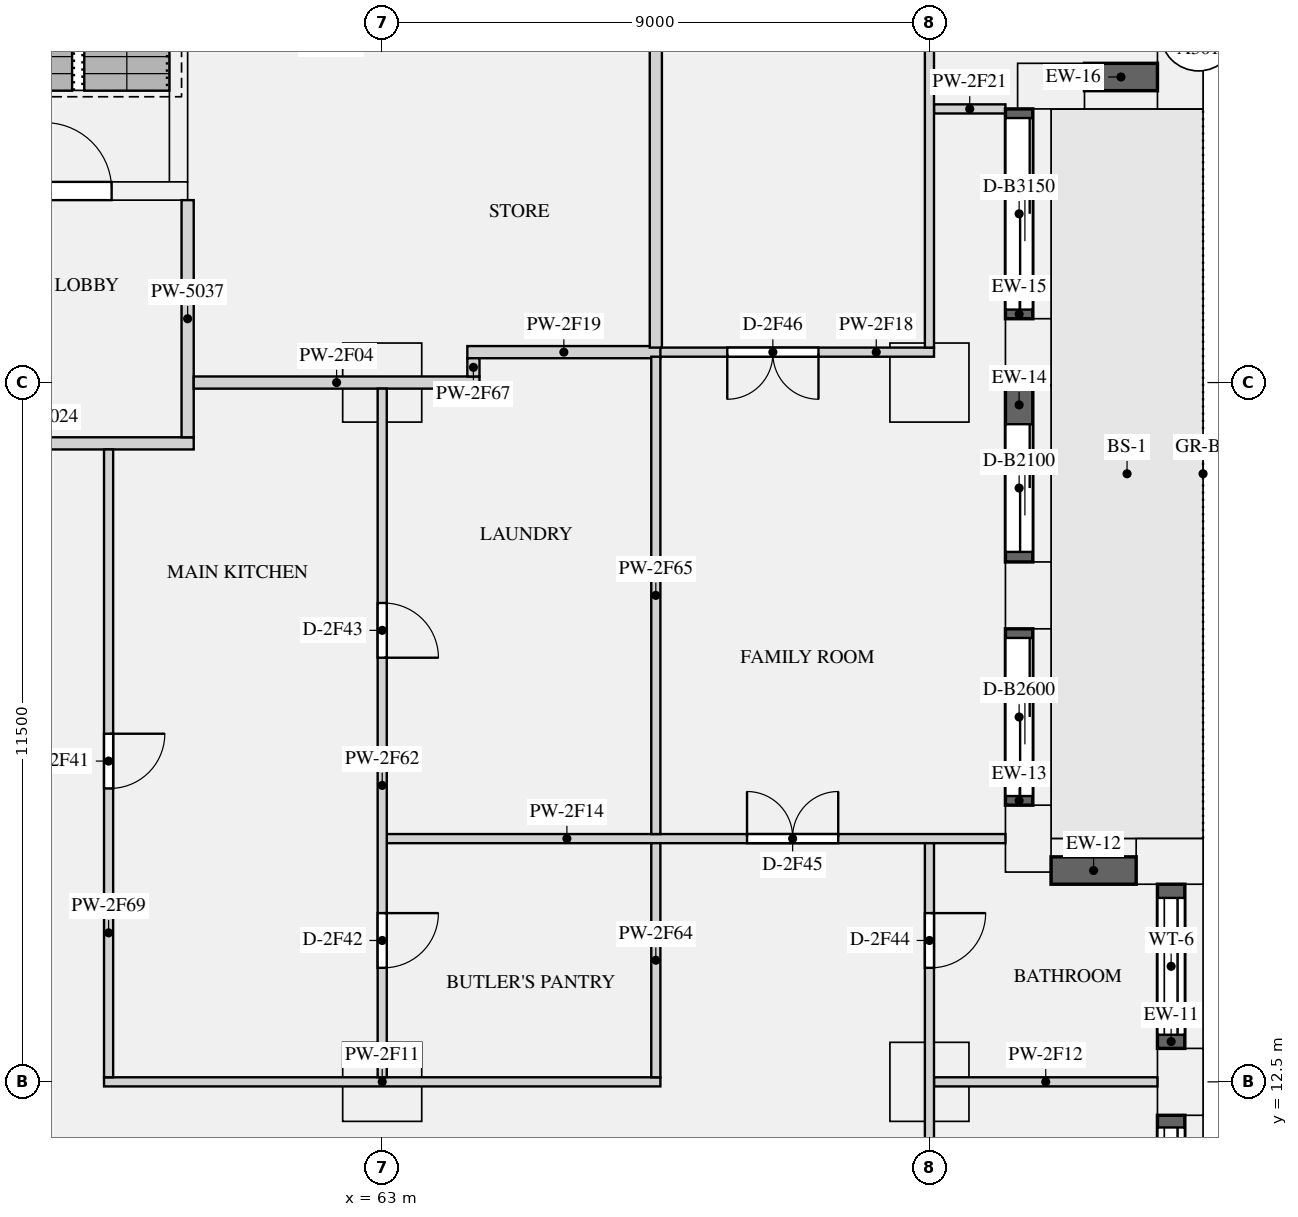
"""IFC4 building model, lengths in metres.
Left out: names, types, materials, properties, quantities, classifications, styles, units other than length and angle.
Written with IfcOpenShell. Run it as: python <this file> out.ifc"""

import sys

from ifc_helpers import new_model, si_unit, direction, frame, frame_2d, origin, origin_2d, place, context, subcontext, project, spatial, rectangle, extrude, element, fill, save


model = new_model("IFC4")
c1 = context("Model", 3, precision=1e-05, world=origin(), true_north=direction((0.0, 1.0)))
c2 = subcontext(c1, "Body", "Model", "MODEL_VIEW")
j1 = project(units=[si_unit("LENGTHUNIT", "METRE"), si_unit("PLANEANGLEUNIT", "RADIAN")], contexts=[c1])
p1 = place(None, origin())
s1 = spatial("IfcSite", under=j1, at=p1, CompositionType="ELEMENT")
p2 = place(p1, origin())
s2 = spatial("IfcBuilding", under=s1, at=p2, CompositionType="ELEMENT")
p3 = place(p2, frame((0.0, 0.0, 127.65)))
s3 = spatial("IfcBuildingStorey", under=s2, at=p3, CompositionType="ELEMENT", Elevation=127.65)
for number, where, z_axis, x_axis in (
    (1, (76.125, 12.5, 0.0), (0.0, 0.0, 1.0), (0.0, 1.0, 0.0)),
    (2, (75.95, 16.125, 0.0), (0.0, 0.0, 1.0), (-1.0, 0.0, 0.0)),
    (3, (73.625, 16.5, 0.0), (0.0, 0.0, 1.0), (0.0, 1.0, 0.0)),
    (4, (73.625, 20.5, 0.0), (0.0, 0.0, 1.0), (0.0, 1.0, 0.0)),
    (5, (73.625, 24.5, 0.0), (0.0, 0.0, 1.0), (0.0, 1.0, 0.0)),
    (6, (74.0, 28.875, 0.0), (0.0, 0.0, 1.0), (1.0, 0.0, 0.0)),
    (7, (76.125, 29.05, 0.0), (0.0, 0.0, 1.0), (0.0, 1.0, 0.0)),
):
    element("IfcColumn", number, at=place(p3, frame(where, z_axis=z_axis, x_axis=x_axis)), inside=s3, PredefinedType="USERDEFINED", context=c2, shape_type="SweptSolid", body=[
        extrude(rectangle(XDim=1.1, YDim=0.75, at=origin_2d()), origin(), (0.0, 0.0, 1.0), 3.15),
    ])
for number, where, z_axis, x_axis in (
    (8, (63.0, 24.0, 0.0), (0.0, 0.0, 1.0), (1.0, 0.0, 0.0)),
    (9, (72.0, 24.0, 0.0), (0.0, 0.0, 1.0), (1.0, 0.0, 0.0)),
    (10, (63.0, 12.5, 0.0), (0.0, 0.0, 1.0), (1.0, 0.0, 0.0)),
    (11, (72.0, 12.5, 0.0), (0.0, 0.0, 1.0), (1.0, 0.0, 0.0)),
):
    element("IfcColumn", number, at=place(p3, frame(where, z_axis=z_axis, x_axis=x_axis)), inside=s3, PredefinedType="COLUMN", context=c2, shape_type="SweptSolid", body=[
        extrude(rectangle(XDim=1.3, YDim=1.3, at=origin_2d()), origin(), (0.0, 0.0, 1.0), 3.15),
    ])
p4 = place(p3, frame((56.2, 27.15, 0.0), z_axis=(0.0, 0.0, 1.0), x_axis=(1.0, 0.0, 0.0)))
e12 = element("IfcWall", 12, at=p4, inside=s3, PredefinedType="SHEAR", context=c2, shape_type="SweptSolid", body=[
    extrude(rectangle(XDim=3.6, YDim=0.3, at=frame_2d((1.8, 0.0))), origin(), (0.0, 0.0, 1.0), 3.15),
])
p5 = place(p4, frame((1.25, 0.0, 0.0)))
e13 = element("IfcOpeningElement", 13, at=p5, cuts=e12, PredefinedType="OPENING", context=c2, shape_type="SweptSolid", body=[
    extrude(rectangle(XDim=1.1, YDim=2.1, at=frame_2d((0.55, 1.05))), frame((0.0, 0.16, 0.0), z_axis=(0.0, -1.0, 0.0), x_axis=(1.0, 0.0, 0.0)), (0.0, 0.0, 1.0), 0.32),
])
p6 = place(p3, frame((59.65, 27.3, 0.0), z_axis=(0.0, 0.0, 1.0), x_axis=(0.0, 1.0, 0.0)))
e14 = element("IfcWall", 14, at=p6, inside=s3, PredefinedType="SHEAR", context=c2, shape_type="SweptSolid", body=[
    extrude(rectangle(XDim=7.8, YDim=0.3, at=frame_2d((3.9, 0.0))), origin(), (0.0, 0.0, 1.0), 3.15),
])
p7 = place(p3, frame((75.975, 9.05, 0.9), z_axis=(0.0, 0.0, 1.0), x_axis=(0.0, 1.0, 0.0)))
e15 = element("IfcWall", 15, at=p7, inside=s3, PredefinedType="SOLIDWALL", context=c2, shape_type="SweptSolid", body=[
    extrude(rectangle(XDim=2.9, YDim=0.45, at=frame_2d((1.45, 0.0))), origin(), (0.0, 0.0, 1.0), 1.75),
])
p8 = place(p7, frame((0.2, 0.0, 0.15)))
e16 = element("IfcOpeningElement", 16, at=p8, cuts=e15, PredefinedType="OPENING", context=c2, shape_type="SweptSolid", body=[
    extrude(rectangle(XDim=2.5, YDim=1.5, at=frame_2d((1.25, 0.75))), frame((0.0, 0.235, 0.0), z_axis=(0.0, -1.0, 0.0), x_axis=(1.0, 0.0, 0.0)), (0.0, 0.0, 1.0), 0.47),
])
p9 = place(p3, frame((75.975, 13.05, 0.9), z_axis=(0.0, 0.0, 1.0), x_axis=(0.0, 1.0, 0.0)))
e17 = element("IfcWall", 17, at=p9, inside=s3, PredefinedType="SOLIDWALL", context=c2, shape_type="SweptSolid", body=[
    extrude(rectangle(XDim=2.7, YDim=0.45, at=frame_2d((1.35, 0.0))), origin(), (0.0, 0.0, 1.0), 1.75),
])
p10 = place(p9, frame((0.225, 0.0, 0.15)))
e18 = element("IfcOpeningElement", 18, at=p10, cuts=e17, PredefinedType="OPENING", context=c2, shape_type="SweptSolid", body=[
    extrude(rectangle(XDim=2.25, YDim=1.5, at=frame_2d((1.125, 0.75))), frame((0.0, 0.235, 0.0), z_axis=(0.0, -1.0, 0.0), x_axis=(1.0, 0.0, 0.0)), (0.0, 0.0, 1.0), 0.47),
])
p11 = place(p3, frame((75.4, 15.975, 0.9), z_axis=(0.0, 0.0, 1.0), x_axis=(-1.0, 0.0, 0.0)))
e19 = element("IfcWall", 19, at=p11, inside=s3, PredefinedType="SOLIDWALL", context=c2, shape_type="SweptSolid", body=[
    extrude(rectangle(XDim=1.4, YDim=0.45, at=frame_2d((0.7, 0.0))), origin(), (0.0, 0.0, 1.0), 1.75),
])
p12 = place(p3, frame((73.475, 17.05, 0.0), z_axis=(0.0, 0.0, 1.0), x_axis=(0.0, 1.0, 0.0)))
e20 = element("IfcWall", 20, at=p12, inside=s3, PredefinedType="SOLIDWALL", context=c2, shape_type="SweptSolid", body=[
    extrude(rectangle(XDim=2.9, YDim=0.45, at=frame_2d((1.45, 0.0))), origin(), (0.0, 0.0, 1.0), 2.65),
])
p13 = place(p12, frame((0.15, 0.0, 0.0)))
e21 = element("IfcOpeningElement", 21, at=p13, cuts=e20, PredefinedType="OPENING", context=c2, shape_type="SweptSolid", body=[
    extrude(rectangle(XDim=2.6, YDim=2.3, at=frame_2d((1.3, 1.15))), frame((0.0, 0.235, 0.0), z_axis=(0.0, -1.0, 0.0), x_axis=(1.0, 0.0, 0.0)), (0.0, 0.0, 1.0), 0.47),
])
p14 = place(p3, frame((73.475, 21.05, 0.0), z_axis=(0.0, 0.0, 1.0), x_axis=(0.0, 1.0, 0.0)))
e22 = element("IfcWall", 22, at=p14, inside=s3, PredefinedType="SOLIDWALL", context=c2, shape_type="SweptSolid", body=[
    extrude(rectangle(XDim=2.9, YDim=0.45, at=frame_2d((1.45, 0.0))), origin(), (0.0, 0.0, 1.0), 2.65),
])
p15 = place(p14, frame((0.165, 0.0, 0.0)))
e23 = element("IfcOpeningElement", 23, at=p15, cuts=e22, PredefinedType="OPENING", context=c2, shape_type="SweptSolid", body=[
    extrude(rectangle(XDim=2.1, YDim=2.3, at=frame_2d((1.05, 1.15))), frame((0.0, 0.235, 0.0), z_axis=(0.0, -1.0, 0.0), x_axis=(1.0, 0.0, 0.0)), (0.0, 0.0, 1.0), 0.47),
])
p16 = place(p3, frame((73.475, 25.05, 0.0), z_axis=(0.0, 0.0, 1.0), x_axis=(0.0, 1.0, 0.0)))
e24 = element("IfcWall", 24, at=p16, inside=s3, PredefinedType="SOLIDWALL", context=c2, shape_type="SweptSolid", body=[
    extrude(rectangle(XDim=3.45, YDim=0.45, at=frame_2d((1.725, 0.0))), origin(), (0.0, 0.0, 1.0), 2.65),
])
p17 = place(p16, frame((0.15, 0.0, 0.0)))
e25 = element("IfcOpeningElement", 25, at=p17, cuts=e24, PredefinedType="OPENING", context=c2, shape_type="SweptSolid", body=[
    extrude(rectangle(XDim=3.15, YDim=2.3, at=frame_2d((1.575, 1.15))), frame((0.0, 0.235, 0.0), z_axis=(0.0, -1.0, 0.0), x_axis=(1.0, 0.0, 0.0)), (0.0, 0.0, 1.0), 0.47),
])
p18 = place(p3, frame((74.55, 29.025, 0.9), z_axis=(0.0, 0.0, 1.0), x_axis=(1.0, 0.0, 0.0)))
e26 = element("IfcWall", 26, at=p18, inside=s3, PredefinedType="SOLIDWALL", context=c2, shape_type="SweptSolid", body=[
    extrude(rectangle(XDim=1.2, YDim=0.45, at=frame_2d((0.6, 0.0))), origin(), (0.0, 0.0, 1.0), 1.75),
])
p19 = place(p3, frame((54.9, 23.0, 0.0), z_axis=(0.0, 0.0, 1.0), x_axis=(1.0, 0.0, 0.0)))
e27 = element("IfcWall", 27, at=p19, inside=s3, PredefinedType="PARTITIONING", context=c2, shape_type="SweptSolid", body=[
    extrude(rectangle(XDim=5.0, YDim=0.2, at=frame_2d((2.5, 0.0))), origin(), (0.0, 0.0, 1.0), 2.65),
])
p20 = place(p3, frame((59.8, 23.1, 0.0), z_axis=(0.0, 0.0, 1.0), x_axis=(0.0, 1.0, 0.0)))
e28 = element("IfcWall", 28, at=p20, inside=s3, PredefinedType="PARTITIONING", context=c2, shape_type="SweptSolid", body=[
    extrude(rectangle(XDim=3.9, YDim=0.2, at=frame_2d((1.95, 0.0))), origin(), (0.0, 0.0, 1.0), 2.65),
])
p21 = place(p3, frame((59.9, 24.0, 0.0), z_axis=(0.0, 0.0, 1.0), x_axis=(1.0, 0.0, 0.0)))
e29 = element("IfcWall", 29, at=p21, inside=s3, PredefinedType="PARTITIONING", context=c2, shape_type="SweptSolid", body=[
    extrude(rectangle(XDim=4.7, YDim=0.2, at=frame_2d((2.35, 0.0))), origin(), (0.0, 0.0, 1.0), 2.65),
])
p22 = place(p3, frame((58.425, 12.5, 0.0), z_axis=(0.0, 0.0, 1.0), x_axis=(1.0, 0.0, 0.0)))
e30 = element("IfcWall", 30, at=p22, inside=s3, PredefinedType="PARTITIONING", context=c2, shape_type="SweptSolid", body=[
    extrude(rectangle(XDim=9.15, YDim=0.15, at=frame_2d((4.575, 0.0))), origin(), (0.0, 0.0, 1.0), 2.65),
])
p23 = place(p3, frame((72.075, 12.5, 0.0), z_axis=(0.0, 0.0, 1.0), x_axis=(1.0, 0.0, 0.0)))
e31 = element("IfcWall", 31, at=p23, inside=s3, PredefinedType="PARTITIONING", context=c2, shape_type="SweptSolid", body=[
    extrude(rectangle(XDim=3.675, YDim=0.15, at=frame_2d((1.837, 0.0))), origin(), (0.0, 0.0, 1.0), 2.65),
])
p24 = place(p3, frame((63.075, 16.5, 0.0), z_axis=(0.0, 0.0, 1.0), x_axis=(1.0, 0.0, 0.0)))
e32 = element("IfcWall", 32, at=p24, inside=s3, PredefinedType="PARTITIONING", context=c2, shape_type="SweptSolid", body=[
    extrude(rectangle(XDim=10.175, YDim=0.15, at=frame_2d((5.087, 0.0))), origin(), (0.0, 0.0, 1.0), 2.65),
])
p25 = place(p24, frame((5.925, 0.0, 0.0)))
e33 = element("IfcOpeningElement", 33, at=p25, cuts=e32, PredefinedType="OPENING", context=c2, shape_type="SweptSolid", body=[
    extrude(rectangle(XDim=1.5, YDim=2.1, at=frame_2d((0.75, 1.05))), frame((0.0, 0.085, 0.0), z_axis=(0.0, -1.0, 0.0), x_axis=(1.0, 0.0, 0.0)), (0.0, 0.0, 1.0), 0.17),
])
p26 = place(p3, frame((67.425, 24.5, 0.0), z_axis=(0.0, 0.0, 1.0), x_axis=(1.0, 0.0, 0.0)))
e34 = element("IfcWall", 34, at=p26, inside=s3, PredefinedType="PARTITIONING", context=c2, shape_type="SweptSolid", body=[
    extrude(rectangle(XDim=4.65, YDim=0.15, at=frame_2d((2.325, 0.0))), origin(), (0.0, 0.0, 1.0), 2.65),
])
p27 = place(p26, frame((1.25, 0.0, 0.0)))
e35 = element("IfcOpeningElement", 35, at=p27, cuts=e34, PredefinedType="OPENING", context=c2, shape_type="SweptSolid", body=[
    extrude(rectangle(XDim=1.5, YDim=2.1, at=frame_2d((0.75, 1.05))), frame((0.0, 0.085, 0.0), z_axis=(0.0, -1.0, 0.0), x_axis=(1.0, 0.0, 0.0)), (0.0, 0.0, 1.0), 0.17),
])
p28 = place(p3, frame((64.4, 24.5, 0.0), z_axis=(0.0, 0.0, 1.0), x_axis=(1.0, 0.0, 0.0)))
e36 = element("IfcWall", 36, at=p28, inside=s3, PredefinedType="PARTITIONING", context=c2, shape_type="SweptSolid", body=[
    extrude(rectangle(XDim=3.175, YDim=0.2, at=frame_2d((1.587, 0.0))), origin(), (0.0, 0.0, 1.0), 2.65),
])
p29 = place(p3, frame((72.075, 28.5, 0.0), z_axis=(0.0, 0.0, 1.0), x_axis=(1.0, 0.0, 0.0)))
e37 = element("IfcWall", 37, at=p29, inside=s3, PredefinedType="PARTITIONING", context=c2, shape_type="SweptSolid", body=[
    extrude(rectangle(XDim=1.175, YDim=0.15, at=frame_2d((0.587, 0.0))), origin(), (0.0, 0.0, 1.0), 2.65),
])
p30 = place(p3, frame((63.0, 12.575, 0.0), z_axis=(0.0, 0.0, 1.0), x_axis=(0.0, 1.0, 0.0)))
e38 = element("IfcWall", 38, at=p30, inside=s3, PredefinedType="PARTITIONING", context=c2, shape_type="SweptSolid", body=[
    extrude(rectangle(XDim=11.325, YDim=0.15, at=frame_2d((5.663, 0.0))), origin(), (0.0, 0.0, 1.0), 2.65),
])
p31 = place(p30, frame((1.8, 0.0, 0.0)))
e39 = element("IfcOpeningElement", 39, at=p31, cuts=e38, PredefinedType="OPENING", context=c2, shape_type="SweptSolid", body=[
    extrude(rectangle(XDim=0.9, YDim=2.1, at=frame_2d((0.45, 1.05))), frame((0.0, 0.085, 0.0), z_axis=(0.0, -1.0, 0.0), x_axis=(1.0, 0.0, 0.0)), (0.0, 0.0, 1.0), 0.17),
])
p32 = place(p30, frame((6.9, 0.0, 0.0)))
e40 = element("IfcOpeningElement", 40, at=p32, cuts=e38, PredefinedType="OPENING", context=c2, shape_type="SweptSolid", body=[
    extrude(rectangle(XDim=0.9, YDim=2.1, at=frame_2d((0.45, 1.05))), frame((0.0, 0.085, 0.0), z_axis=(0.0, -1.0, 0.0), x_axis=(1.0, 0.0, 0.0)), (0.0, 0.0, 1.0), 0.17),
])
p33 = place(p3, frame((67.5, 12.575, 0.0), z_axis=(0.0, 0.0, 1.0), x_axis=(0.0, 1.0, 0.0)))
e41 = element("IfcWall", 41, at=p33, inside=s3, PredefinedType="PARTITIONING", context=c2, shape_type="SweptSolid", body=[
    extrude(rectangle(XDim=3.85, YDim=0.15, at=frame_2d((1.925, 0.0))), origin(), (0.0, 0.0, 1.0), 2.65),
])
p34 = place(p3, frame((67.5, 16.575, 0.0), z_axis=(0.0, 0.0, 1.0), x_axis=(0.0, 1.0, 0.0)))
e42 = element("IfcWall", 42, at=p34, inside=s3, PredefinedType="PARTITIONING", context=c2, shape_type="SweptSolid", body=[
    extrude(rectangle(XDim=7.85, YDim=0.15, at=frame_2d((3.925, 0.0))), origin(), (0.0, 0.0, 1.0), 2.65),
])
p35 = place(p3, frame((67.5, 24.575, 0.0), z_axis=(0.0, 0.0, 1.0), x_axis=(0.0, 1.0, 0.0)))
e43 = element("IfcWall", 43, at=p35, inside=s3, PredefinedType="PARTITIONING", context=c2, shape_type="SweptSolid", body=[
    extrude(rectangle(XDim=20.175, YDim=0.2, at=frame_2d((10.087, 0.0))), origin(), (0.0, 0.0, 1.0), 2.65),
])
p36 = place(p3, frame((64.5, 24.1, 0.0), z_axis=(0.0, 0.0, 1.0), x_axis=(0.0, 1.0, 0.0)))
e44 = element("IfcWall", 44, at=p36, inside=s3, PredefinedType="PARTITIONING", context=c2, shape_type="SweptSolid", body=[
    extrude(rectangle(XDim=0.3, YDim=0.2, at=frame_2d((0.15, 0.0))), origin(), (0.0, 0.0, 1.0), 2.65),
])
p37 = place(p3, frame((58.5, 12.575, 0.0), z_axis=(0.0, 0.0, 1.0), x_axis=(0.0, 1.0, 0.0)))
e45 = element("IfcWall", 45, at=p37, inside=s3, PredefinedType="PARTITIONING", context=c2, shape_type="SweptSolid", body=[
    extrude(rectangle(XDim=10.325, YDim=0.15, at=frame_2d((5.163, 0.0))), origin(), (0.0, 0.0, 1.0), 2.65),
])
p38 = place(p37, frame((4.75, 0.0, 0.0)))
e46 = element("IfcOpeningElement", 46, at=p38, cuts=e45, PredefinedType="OPENING", context=c2, shape_type="SweptSolid", body=[
    extrude(rectangle(XDim=0.9, YDim=2.1, at=frame_2d((0.45, 1.05))), frame((0.0, 0.085, 0.0), z_axis=(0.0, -1.0, 0.0), x_axis=(1.0, 0.0, 0.0)), (0.0, 0.0, 1.0), 0.17),
])
p39 = place(p3, frame((72.0, 5.25, 0.0), z_axis=(0.0, 0.0, 1.0), x_axis=(0.0, 1.0, 0.0)))
e47 = element("IfcWall", 47, at=p39, inside=s3, PredefinedType="PARTITIONING", context=c2, shape_type="SweptSolid", body=[
    extrude(rectangle(XDim=11.175, YDim=0.15, at=frame_2d((5.587, 0.0))), origin(), (0.0, 0.0, 1.0), 2.65),
])
p40 = place(p39, frame((4.475, 0.0, 0.0)))
e48 = element("IfcOpeningElement", 48, at=p40, cuts=e47, PredefinedType="OPENING", context=c2, shape_type="SweptSolid", body=[
    extrude(rectangle(XDim=0.9, YDim=2.1, at=frame_2d((0.45, 1.05))), frame((0.0, 0.085, 0.0), z_axis=(0.0, -1.0, 0.0), x_axis=(1.0, 0.0, 0.0)), (0.0, 0.0, 1.0), 0.17),
])
p41 = place(p39, frame((9.125, 0.0, 0.0)))
e49 = element("IfcOpeningElement", 49, at=p41, cuts=e47, PredefinedType="OPENING", context=c2, shape_type="SweptSolid", body=[
    extrude(rectangle(XDim=0.9, YDim=2.1, at=frame_2d((0.45, 1.05))), frame((0.0, 0.085, 0.0), z_axis=(0.0, -1.0, 0.0), x_axis=(1.0, 0.0, 0.0)), (0.0, 0.0, 1.0), 0.17),
])
p42 = place(p3, frame((72.0, 24.575, 0.0), z_axis=(0.0, 0.0, 1.0), x_axis=(0.0, 1.0, 0.0)))
e50 = element("IfcWall", 50, at=p42, inside=s3, PredefinedType="PARTITIONING", context=c2, shape_type="SweptSolid", body=[
    extrude(rectangle(XDim=15.675, YDim=0.15, at=frame_2d((7.837, 0.0))), origin(), (0.0, 0.0, 1.0), 2.65),
])
p43 = place(p42, frame((6.65, 0.0, 0.0)))
e51 = element("IfcOpeningElement", 51, at=p43, cuts=e50, PredefinedType="OPENING", context=c2, shape_type="SweptSolid", body=[
    extrude(rectangle(XDim=0.9, YDim=2.1, at=frame_2d((0.45, 1.05))), frame((0.0, 0.085, 0.0), z_axis=(0.0, -1.0, 0.0), x_axis=(1.0, 0.0, 0.0)), (0.0, 0.0, 1.0), 0.17),
])
p44 = place(p8, origin())
e52 = element("IfcWindow", 52, at=p44, inside=s3, PartitioningType="SINGLE_PANEL", PredefinedType="WINDOW", context=c2, shape_type="SweptSolid", body=[
    extrude(rectangle(XDim=2.5, YDim=1.5, at=frame_2d((1.25, 0.75))), frame((0.0, -0.065, 0.0), z_axis=(0.0, -1.0, 0.0), x_axis=(1.0, 0.0, 0.0)), (0.0, 0.0, 1.0), 0.06),
])
fill(e16, e52)
p45 = place(p10, origin())
e53 = element("IfcWindow", 53, at=p45, inside=s3, PartitioningType="SINGLE_PANEL", PredefinedType="WINDOW", context=c2, shape_type="SweptSolid", body=[
    extrude(rectangle(XDim=2.25, YDim=1.5, at=frame_2d((1.125, 0.75))), frame((0.0, -0.065, 0.0), z_axis=(0.0, -1.0, 0.0), x_axis=(1.0, 0.0, 0.0)), (0.0, 0.0, 1.0), 0.06),
])
fill(e18, e53)
p46 = place(p13, origin())
e54 = element("IfcDoor", 54, at=p46, inside=s3, OperationType="SLIDING_TO_LEFT", PredefinedType="DOOR", context=c2, shape_type="SweptSolid", body=[
    extrude(rectangle(XDim=2.6, YDim=2.3, at=frame_2d((1.3, 1.15))), frame((0.0, -0.07, 0.0), z_axis=(0.0, -1.0, 0.0), x_axis=(1.0, 0.0, 0.0)), (0.0, 0.0, 1.0), 0.05),
])
fill(e21, e54)
p47 = place(p15, origin())
e55 = element("IfcDoor", 55, at=p47, inside=s3, OperationType="SLIDING_TO_LEFT", PredefinedType="DOOR", context=c2, shape_type="SweptSolid", body=[
    extrude(rectangle(XDim=2.1, YDim=2.3, at=frame_2d((1.05, 1.15))), frame((0.0, -0.07, 0.0), z_axis=(0.0, -1.0, 0.0), x_axis=(1.0, 0.0, 0.0)), (0.0, 0.0, 1.0), 0.05),
])
fill(e23, e55)
p48 = place(p17, origin())
e56 = element("IfcDoor", 56, at=p48, inside=s3, OperationType="SLIDING_TO_LEFT", PredefinedType="DOOR", context=c2, shape_type="SweptSolid", body=[
    extrude(rectangle(XDim=3.15, YDim=2.3, at=frame_2d((1.575, 1.15))), frame((0.0, -0.07, 0.0), z_axis=(0.0, -1.0, 0.0), x_axis=(1.0, 0.0, 0.0)), (0.0, 0.0, 1.0), 0.05),
])
fill(e25, e56)
p49 = place(p5, origin())
e57 = element("IfcDoor", 57, at=p49, inside=s3, OperationType="SINGLE_SWING_LEFT", PredefinedType="DOOR", context=c2, shape_type="SweptSolid", body=[
    extrude(rectangle(XDim=1.1, YDim=2.1, at=frame_2d((0.55, 1.05))), frame((0.0, 0.025, 0.0), z_axis=(0.0, -1.0, 0.0), x_axis=(1.0, 0.0, 0.0)), (0.0, 0.0, 1.0), 0.05),
])
fill(e13, e57)
p50 = place(p38, frame((0.9, 0.0, 0.0), z_axis=(0.0, 0.0, 1.0), x_axis=(-1.0, 0.0, 0.0)))
e58 = element("IfcDoor", 58, at=p50, inside=s3, OperationType="SINGLE_SWING_LEFT", PredefinedType="DOOR", context=c2, shape_type="SweptSolid", body=[
    extrude(rectangle(XDim=0.9, YDim=2.1, at=frame_2d((0.45, 1.05))), frame((0.0, 0.025, 0.0), z_axis=(0.0, -1.0, 0.0), x_axis=(1.0, 0.0, 0.0)), (0.0, 0.0, 1.0), 0.05),
])
fill(e46, e58)
p51 = place(p31, frame((0.9, 0.0, 0.0), z_axis=(0.0, 0.0, 1.0), x_axis=(-1.0, 0.0, 0.0)))
e59 = element("IfcDoor", 59, at=p51, inside=s3, OperationType="SINGLE_SWING_LEFT", PredefinedType="DOOR", context=c2, shape_type="SweptSolid", body=[
    extrude(rectangle(XDim=0.9, YDim=2.1, at=frame_2d((0.45, 1.05))), frame((0.0, 0.025, 0.0), z_axis=(0.0, -1.0, 0.0), x_axis=(1.0, 0.0, 0.0)), (0.0, 0.0, 1.0), 0.05),
])
fill(e39, e59)
p52 = place(p32, frame((0.9, 0.0, 0.0), z_axis=(0.0, 0.0, 1.0), x_axis=(-1.0, 0.0, 0.0)))
e60 = element("IfcDoor", 60, at=p52, inside=s3, OperationType="SINGLE_SWING_RIGHT", PredefinedType="DOOR", context=c2, shape_type="SweptSolid", body=[
    extrude(rectangle(XDim=0.9, YDim=2.1, at=frame_2d((0.45, 1.05))), frame((0.0, 0.025, 0.0), z_axis=(0.0, -1.0, 0.0), x_axis=(1.0, 0.0, 0.0)), (0.0, 0.0, 1.0), 0.05),
])
fill(e40, e60)
p53 = place(p41, frame((0.9, 0.0, 0.0), z_axis=(0.0, 0.0, 1.0), x_axis=(-1.0, 0.0, 0.0)))
e61 = element("IfcDoor", 61, at=p53, inside=s3, OperationType="SINGLE_SWING_LEFT", PredefinedType="DOOR", context=c2, shape_type="SweptSolid", body=[
    extrude(rectangle(XDim=0.9, YDim=2.1, at=frame_2d((0.45, 1.05))), frame((0.0, 0.025, 0.0), z_axis=(0.0, -1.0, 0.0), x_axis=(1.0, 0.0, 0.0)), (0.0, 0.0, 1.0), 0.05),
])
fill(e49, e61)
p54 = place(p25, origin())
e62 = element("IfcDoor", 62, at=p54, inside=s3, OperationType="DOUBLE_DOOR_SINGLE_SWING", PredefinedType="DOOR", context=c2, shape_type="SweptSolid", body=[
    extrude(rectangle(XDim=1.5, YDim=2.1, at=frame_2d((0.75, 1.05))), frame((0.0, 0.025, 0.0), z_axis=(0.0, -1.0, 0.0), x_axis=(1.0, 0.0, 0.0)), (0.0, 0.0, 1.0), 0.05),
])
fill(e33, e62)
p55 = place(p27, frame((1.5, 0.0, 0.0), z_axis=(0.0, 0.0, 1.0), x_axis=(-1.0, 0.0, 0.0)))
e63 = element("IfcDoor", 63, at=p55, inside=s3, OperationType="DOUBLE_DOOR_SINGLE_SWING", PredefinedType="DOOR", context=c2, shape_type="SweptSolid", body=[
    extrude(rectangle(XDim=1.5, YDim=2.1, at=frame_2d((0.75, 1.05))), frame((0.0, 0.025, 0.0), z_axis=(0.0, -1.0, 0.0), x_axis=(1.0, 0.0, 0.0)), (0.0, 0.0, 1.0), 0.05),
])
fill(e35, e63)
save(model, sys.argv[1])
